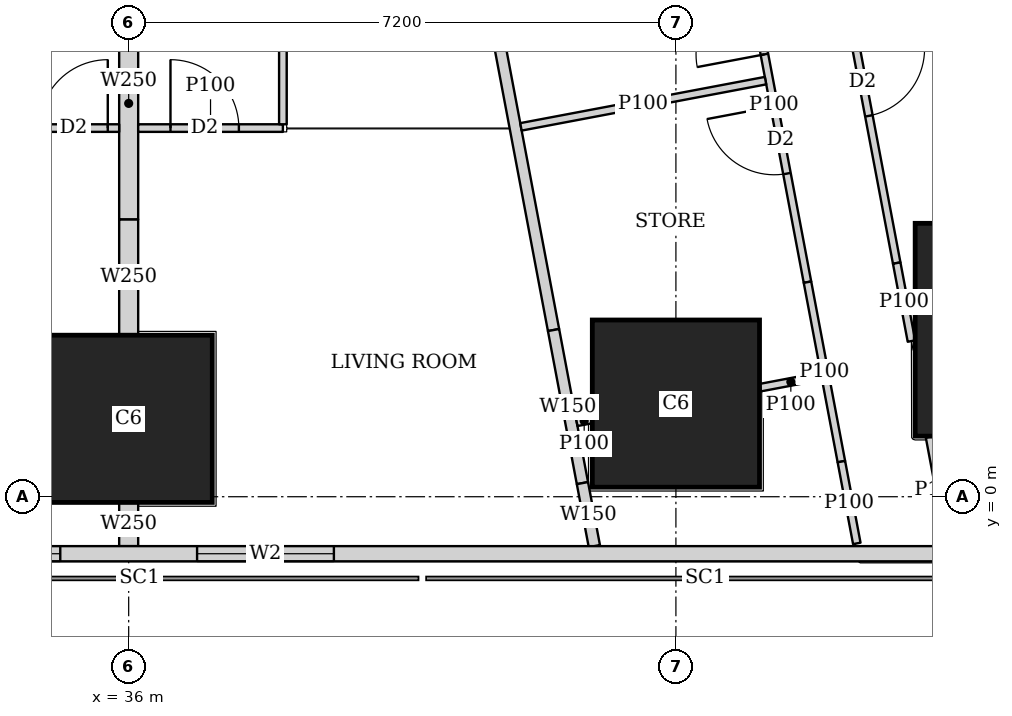
"""IFC4 building model, lengths in metres.
Left out: names, types, materials, properties, quantities, classifications, styles, units other than length and angle.
Written with IfcOpenShell. Run it as: python <this file> out.ifc"""

import sys

from ifc_helpers import new_model, si_unit, direction, frame, frame_2d, origin, origin_2d, place, context, subcontext, project, spatial, rectangle, extrude, element, fill, save


model = new_model("IFC4")
c1 = context("Model", 3, precision=1e-05, world=origin(), true_north=direction((0.0, 1.0)))
c2 = subcontext(c1, "Body", "Model", "MODEL_VIEW")
j1 = project(units=[si_unit("LENGTHUNIT", "METRE"), si_unit("PLANEANGLEUNIT", "RADIAN")], contexts=[c1])
p1 = place(None, origin())
s1 = spatial("IfcSite", under=j1, at=p1, CompositionType="ELEMENT")
p2 = place(p1, origin())
s2 = spatial("IfcBuilding", under=s1, at=p2, CompositionType="ELEMENT")
p3 = place(p2, frame((0.0, 0.0, 126.65)))
s3 = spatial("IfcBuildingStorey", under=s2, at=p3, CompositionType="ELEMENT", Elevation=126.65)
for number, where, z_axis, x_axis in (
    (1, (36.0, 1.025, 0.0), (0.0, 0.0, 1.0), (1.0, 0.0, 0.0)),
    (2, (43.2, 1.225, 0.0), (0.0, 0.0, 1.0), (1.0, 0.0, 0.0)),
):
    element("IfcColumn", number, at=place(p3, frame(where, z_axis=z_axis, x_axis=x_axis)), inside=s3, PredefinedType="COLUMN", context=c2, shape_type="SweptSolid", body=[
        extrude(rectangle(XDim=2.2, YDim=2.2, at=origin_2d()), origin(), (0.0, 0.0, 1.0), 3.75),
    ])
p4 = place(p3, frame((47.748, 2.197, 0.0), z_axis=(0.0, 0.0, 1.0), x_axis=(1.0, 0.0, 0.0)))
e3 = element("IfcColumn", 3, at=p4, inside=s3, PredefinedType="COLUMN", context=c2, shape_type="SweptSolid", body=[
    extrude(rectangle(XDim=2.8, YDim=2.8, at=origin_2d()), origin(), (0.0, 0.0, 1.0), 3.75),
])
p5 = place(p3, frame((2.163, -0.75, 0.0), z_axis=(0.0, 0.0, 1.0), x_axis=(1.0, 0.0, 0.0)))
e4 = element("IfcWall", 4, at=p5, inside=s3, PredefinedType="SOLIDWALL", context=c2, shape_type="SweptSolid", body=[
    extrude(rectangle(XDim=45.628, YDim=0.2, at=frame_2d((22.814, 0.0))), origin(), (0.0, 0.0, 1.0), 3.45),
])
p6 = place(p5, frame((9.537, 0.0, 0.9)))
e5 = element("IfcOpeningElement", 5, at=p6, cuts=e4, PredefinedType="OPENING", context=c2, shape_type="SweptSolid", body=[
    extrude(rectangle(XDim=1.8, YDim=1.5, at=frame_2d((0.9, 0.75))), frame((0.0, 0.11, 0.0), z_axis=(0.0, -1.0, 0.0), x_axis=(1.0, 0.0, 0.0)), (0.0, 0.0, 1.0), 0.22),
])
p7 = place(p5, frame((13.137, 0.0, 0.9)))
e6 = element("IfcOpeningElement", 6, at=p7, cuts=e4, PredefinedType="OPENING", context=c2, shape_type="SweptSolid", body=[
    extrude(rectangle(XDim=1.8, YDim=1.5, at=frame_2d((0.9, 0.75))), frame((0.0, 0.11, 0.0), z_axis=(0.0, -1.0, 0.0), x_axis=(1.0, 0.0, 0.0)), (0.0, 0.0, 1.0), 0.22),
])
p8 = place(p5, frame((16.737, 0.0, 0.9)))
e7 = element("IfcOpeningElement", 7, at=p8, cuts=e4, PredefinedType="OPENING", context=c2, shape_type="SweptSolid", body=[
    extrude(rectangle(XDim=1.8, YDim=1.5, at=frame_2d((0.9, 0.75))), frame((0.0, 0.11, 0.0), z_axis=(0.0, -1.0, 0.0), x_axis=(1.0, 0.0, 0.0)), (0.0, 0.0, 1.0), 0.22),
])
p9 = place(p5, frame((20.337, 0.0, 0.9)))
e8 = element("IfcOpeningElement", 8, at=p9, cuts=e4, PredefinedType="OPENING", context=c2, shape_type="SweptSolid", body=[
    extrude(rectangle(XDim=1.8, YDim=1.5, at=frame_2d((0.9, 0.75))), frame((0.0, 0.11, 0.0), z_axis=(0.0, -1.0, 0.0), x_axis=(1.0, 0.0, 0.0)), (0.0, 0.0, 1.0), 0.22),
])
p10 = place(p5, frame((23.937, 0.0, 0.9)))
e9 = element("IfcOpeningElement", 9, at=p10, cuts=e4, PredefinedType="OPENING", context=c2, shape_type="SweptSolid", body=[
    extrude(rectangle(XDim=1.8, YDim=1.5, at=frame_2d((0.9, 0.75))), frame((0.0, 0.11, 0.0), z_axis=(0.0, -1.0, 0.0), x_axis=(1.0, 0.0, 0.0)), (0.0, 0.0, 1.0), 0.22),
])
p11 = place(p5, frame((27.537, 0.0, 0.9)))
e10 = element("IfcOpeningElement", 10, at=p11, cuts=e4, PredefinedType="OPENING", context=c2, shape_type="SweptSolid", body=[
    extrude(rectangle(XDim=1.8, YDim=1.5, at=frame_2d((0.9, 0.75))), frame((0.0, 0.11, 0.0), z_axis=(0.0, -1.0, 0.0), x_axis=(1.0, 0.0, 0.0)), (0.0, 0.0, 1.0), 0.22),
])
p12 = place(p5, frame((31.137, 0.0, 0.9)))
e11 = element("IfcOpeningElement", 11, at=p12, cuts=e4, PredefinedType="OPENING", context=c2, shape_type="SweptSolid", body=[
    extrude(rectangle(XDim=1.8, YDim=1.5, at=frame_2d((0.9, 0.75))), frame((0.0, 0.11, 0.0), z_axis=(0.0, -1.0, 0.0), x_axis=(1.0, 0.0, 0.0)), (0.0, 0.0, 1.0), 0.22),
])
p13 = place(p5, frame((34.737, 0.0, 0.9)))
e12 = element("IfcOpeningElement", 12, at=p13, cuts=e4, PredefinedType="OPENING", context=c2, shape_type="SweptSolid", body=[
    extrude(rectangle(XDim=1.8, YDim=1.5, at=frame_2d((0.9, 0.75))), frame((0.0, 0.11, 0.0), z_axis=(0.0, -1.0, 0.0), x_axis=(1.0, 0.0, 0.0)), (0.0, 0.0, 1.0), 0.22),
])
p14 = place(p3, frame((50.653, 2.703, 0.0), z_axis=(0.0, 0.0, 1.0), x_axis=(-0.185612026696, 0.982623109613, 0.0)))
e13 = element("IfcWall", 13, at=p14, inside=s3, PredefinedType="SOLIDWALL", context=c2, shape_type="SweptSolid", body=[
    extrude(rectangle(XDim=41.393, YDim=0.2, at=frame_2d((20.697, 0.0))), origin(), (0.0, 0.0, 1.0), 3.45),
])
p15 = place(p14, frame((1.633, 0.0, 0.9)))
e14 = element("IfcOpeningElement", 14, at=p15, cuts=e13, PredefinedType="OPENING", context=c2, shape_type="SweptSolid", body=[
    extrude(rectangle(XDim=1.8, YDim=1.5, at=frame_2d((0.9, 0.75))), frame((0.0, 0.11, 0.0), z_axis=(0.0, -1.0, 0.0), x_axis=(1.0, 0.0, 0.0)), (0.0, 0.0, 1.0), 0.22),
])
p16 = place(p14, frame((6.032, 0.0, 0.9)))
e15 = element("IfcOpeningElement", 15, at=p16, cuts=e13, PredefinedType="OPENING", context=c2, shape_type="SweptSolid", body=[
    extrude(rectangle(XDim=1.8, YDim=1.5, at=frame_2d((0.9, 0.75))), frame((0.0, 0.11, 0.0), z_axis=(0.0, -1.0, 0.0), x_axis=(1.0, 0.0, 0.0)), (0.0, 0.0, 1.0), 0.22),
])
p17 = place(p14, frame((9.848, 0.0, 0.9)))
e16 = element("IfcOpeningElement", 16, at=p17, cuts=e13, PredefinedType="OPENING", context=c2, shape_type="SweptSolid", body=[
    extrude(rectangle(XDim=1.8, YDim=1.5, at=frame_2d((0.9, 0.75))), frame((0.0, 0.11, 0.0), z_axis=(0.0, -1.0, 0.0), x_axis=(1.0, 0.0, 0.0)), (0.0, 0.0, 1.0), 0.22),
])
p18 = place(p14, frame((13.664, 0.0, 0.9)))
e17 = element("IfcOpeningElement", 17, at=p18, cuts=e13, PredefinedType="OPENING", context=c2, shape_type="SweptSolid", body=[
    extrude(rectangle(XDim=1.8, YDim=1.5, at=frame_2d((0.9, 0.75))), frame((0.0, 0.11, 0.0), z_axis=(0.0, -1.0, 0.0), x_axis=(1.0, 0.0, 0.0)), (0.0, 0.0, 1.0), 0.22),
])
p19 = place(p14, frame((17.481, 0.0, 0.9)))
e18 = element("IfcOpeningElement", 18, at=p19, cuts=e13, PredefinedType="OPENING", context=c2, shape_type="SweptSolid", body=[
    extrude(rectangle(XDim=1.8, YDim=1.5, at=frame_2d((0.9, 0.75))), frame((0.0, 0.11, 0.0), z_axis=(0.0, -1.0, 0.0), x_axis=(1.0, 0.0, 0.0)), (0.0, 0.0, 1.0), 0.22),
])
p20 = place(p14, frame((21.297, 0.0, 0.9)))
e19 = element("IfcOpeningElement", 19, at=p20, cuts=e13, PredefinedType="OPENING", context=c2, shape_type="SweptSolid", body=[
    extrude(rectangle(XDim=1.8, YDim=1.5, at=frame_2d((0.9, 0.75))), frame((0.0, 0.11, 0.0), z_axis=(0.0, -1.0, 0.0), x_axis=(1.0, 0.0, 0.0)), (0.0, 0.0, 1.0), 0.22),
])
p21 = place(p14, frame((25.113, 0.0, 0.9)))
e20 = element("IfcOpeningElement", 20, at=p21, cuts=e13, PredefinedType="OPENING", context=c2, shape_type="SweptSolid", body=[
    extrude(rectangle(XDim=1.8, YDim=1.5, at=frame_2d((0.9, 0.75))), frame((0.0, 0.11, 0.0), z_axis=(0.0, -1.0, 0.0), x_axis=(1.0, 0.0, 0.0)), (0.0, 0.0, 1.0), 0.22),
])
p22 = place(p14, frame((28.93, 0.0, 0.9)))
e21 = element("IfcOpeningElement", 21, at=p22, cuts=e13, PredefinedType="OPENING", context=c2, shape_type="SweptSolid", body=[
    extrude(rectangle(XDim=1.8, YDim=1.5, at=frame_2d((0.9, 0.75))), frame((0.0, 0.11, 0.0), z_axis=(0.0, -1.0, 0.0), x_axis=(1.0, 0.0, 0.0)), (0.0, 0.0, 1.0), 0.22),
])
p23 = place(p14, frame((32.746, 0.0, 0.9)))
e22 = element("IfcOpeningElement", 22, at=p23, cuts=e13, PredefinedType="OPENING", context=c2, shape_type="SweptSolid", body=[
    extrude(rectangle(XDim=1.8, YDim=1.5, at=frame_2d((0.9, 0.75))), frame((0.0, 0.11, 0.0), z_axis=(0.0, -1.0, 0.0), x_axis=(1.0, 0.0, 0.0)), (0.0, 0.0, 1.0), 0.22),
])
p24 = place(p14, frame((36.481, 0.0, 0.9)))
e23 = element("IfcOpeningElement", 23, at=p24, cuts=e13, PredefinedType="OPENING", context=c2, shape_type="SweptSolid", body=[
    extrude(rectangle(XDim=1.8, YDim=1.5, at=frame_2d((0.9, 0.75))), frame((0.0, 0.11, 0.0), z_axis=(0.0, -1.0, 0.0), x_axis=(1.0, 0.0, 0.0)), (0.0, 0.0, 1.0), 0.22),
])
p25 = place(p3, frame((33.896, 42.929, 0.0), z_axis=(0.0, 0.0, 1.0), x_axis=(0.1855961604, -0.982626106535, 0.0)))
e24 = element("IfcWall", 24, at=p25, inside=s3, PredefinedType="SOLIDWALL", context=c2, shape_type="SweptSolid", body=[
    extrude(rectangle(XDim=41.456, YDim=0.15, at=frame_2d((20.728, 0.0))), origin(), (0.0, 0.0, 1.0), 2.45),
])
p26 = place(p25, frame((7.893, 0.0, 0.0)))
e25 = element("IfcOpeningElement", 25, at=p26, cuts=e24, PredefinedType="OPENING", context=c2, shape_type="SweptSolid", body=[
    extrude(rectangle(XDim=1.0, YDim=2.1, at=frame_2d((0.5, 1.05))), frame((0.0, 0.085, 0.0), z_axis=(0.0, -1.0, 0.0), x_axis=(1.0, 0.0, 0.0)), (0.0, 0.0, 1.0), 0.17),
])
p27 = place(p25, frame((12.468, 0.0, 0.0)))
e26 = element("IfcOpeningElement", 26, at=p27, cuts=e24, PredefinedType="OPENING", context=c2, shape_type="SweptSolid", body=[
    extrude(rectangle(XDim=1.0, YDim=2.1, at=frame_2d((0.5, 1.05))), frame((0.0, 0.085, 0.0), z_axis=(0.0, -1.0, 0.0), x_axis=(1.0, 0.0, 0.0)), (0.0, 0.0, 1.0), 0.17),
])
p28 = place(p25, frame((20.101, 0.0, 0.0)))
e27 = element("IfcOpeningElement", 27, at=p28, cuts=e24, PredefinedType="OPENING", context=c2, shape_type="SweptSolid", body=[
    extrude(rectangle(XDim=1.0, YDim=2.1, at=frame_2d((0.5, 1.05))), frame((0.0, 0.085, 0.0), z_axis=(0.0, -1.0, 0.0), x_axis=(1.0, 0.0, 0.0)), (0.0, 0.0, 1.0), 0.17),
])
p29 = place(p25, frame((31.064, 0.0, 0.0)))
e28 = element("IfcOpeningElement", 28, at=p29, cuts=e24, PredefinedType="OPENING", context=c2, shape_type="SweptSolid", body=[
    extrude(rectangle(XDim=1.0, YDim=2.1, at=frame_2d((0.5, 1.05))), frame((0.0, 0.085, 0.0), z_axis=(0.0, -1.0, 0.0), x_axis=(1.0, 0.0, 0.0)), (0.0, 0.0, 1.0), 0.17),
])
p30 = place(p3, frame((41.59, 2.193, 0.0), z_axis=(0.0, 0.0, 1.0), x_axis=(0.185338414215, -0.982674754034, 0.0)))
e29 = element("IfcWall", 29, at=p30, inside=s3, PredefinedType="SOLIDWALL", context=c2, shape_type="SweptSolid", body=[
    extrude(rectangle(XDim=2.05, YDim=0.15, at=frame_2d((1.025, 0.0))), origin(), (0.0, 0.0, 1.0), 2.15),
])
p31 = place(p3, frame((41.97, 0.179, 0.0), z_axis=(0.0, 0.0, 1.0), x_axis=(0.186088003244, -0.982533080893, 0.0)))
e30 = element("IfcWall", 30, at=p31, inside=s3, PredefinedType="SOLIDWALL", context=c2, shape_type="SweptSolid", body=[
    extrude(rectangle(XDim=0.844, YDim=0.15, at=frame_2d((0.422, 0.0))), origin(), (0.0, 0.0, 1.0), 3.45),
])
p32 = place(p3, frame((35.875, 4.85, 0.0), z_axis=(0.0, 0.0, 1.0), x_axis=(-1.0, 0.0, 0.0)))
e31 = element("IfcWall", 31, at=p32, inside=s3, PredefinedType="PARTITIONING", context=c2, shape_type="SweptSolid", body=[
    extrude(rectangle(XDim=3.475, YDim=0.1, at=frame_2d((1.738, 0.0))), origin(), (0.0, 0.0, 1.0), 3.45),
])
p33 = place(p32, frame((1.92, 0.0, 0.0)))
e32 = element("IfcOpeningElement", 32, at=p33, cuts=e31, PredefinedType="OPENING", context=c2, shape_type="SweptSolid", body=[
    extrude(rectangle(XDim=0.9, YDim=2.1, at=frame_2d((0.45, 1.05))), frame((0.0, 0.06, 0.0), z_axis=(0.0, -1.0, 0.0), x_axis=(1.0, 0.0, 0.0)), (0.0, 0.0, 1.0), 0.12),
])
p34 = place(p32, frame((0.15, 0.0, 0.0)))
e33 = element("IfcOpeningElement", 33, at=p34, cuts=e31, PredefinedType="OPENING", context=c2, shape_type="SweptSolid", body=[
    extrude(rectangle(XDim=0.9, YDim=2.1, at=frame_2d((0.45, 1.05))), frame((0.0, 0.06, 0.0), z_axis=(0.0, -1.0, 0.0), x_axis=(1.0, 0.0, 0.0)), (0.0, 0.0, 1.0), 0.12),
])
p35 = place(p3, frame((38.029, 4.85, 0.0), z_axis=(0.0, 0.0, 1.0), x_axis=(-1.0, 0.0, 0.0)))
e34 = element("IfcWall", 34, at=p35, inside=s3, PredefinedType="PARTITIONING", context=c2, shape_type="SweptSolid", body=[
    extrude(rectangle(XDim=1.904, YDim=0.1, at=frame_2d((0.952, 0.0))), origin(), (0.0, 0.0, 1.0), 3.45),
])
p36 = place(p35, frame((0.579, 0.0, 0.0)))
e35 = element("IfcOpeningElement", 35, at=p36, cuts=e34, PredefinedType="OPENING", context=c2, shape_type="SweptSolid", body=[
    extrude(rectangle(XDim=0.9, YDim=2.1, at=frame_2d((0.45, 1.05))), frame((0.0, 0.06, 0.0), z_axis=(0.0, -1.0, 0.0), x_axis=(1.0, 0.0, 0.0)), (0.0, 0.0, 1.0), 0.12),
])
p37 = place(p3, frame((38.029, 4.9, 0.0), z_axis=(0.0, 0.0, 1.0), x_axis=(0.0, 1.0, 0.0)))
e36 = element("IfcWall", 36, at=p37, inside=s3, PredefinedType="PARTITIONING", context=c2, shape_type="SweptSolid", body=[
    extrude(rectangle(XDim=3.275, YDim=0.1, at=frame_2d((1.638, 0.0))), origin(), (0.0, 0.0, 1.0), 3.45),
])
p38 = place(p3, frame((36.0, -0.65, 0.0), z_axis=(0.0, 0.0, 1.0), x_axis=(0.0, 1.0, 0.0)))
e37 = element("IfcWall", 37, at=p38, inside=s3, PredefinedType="SOLIDWALL", context=c2, shape_type="SweptSolid", body=[
    extrude(rectangle(XDim=0.574, YDim=0.25, at=frame_2d((0.287, 0.0))), origin(), (0.0, 0.0, 1.0), 3.45),
])
p39 = place(p3, frame((36.0, 2.126, 0.0), z_axis=(0.0, 0.0, 1.0), x_axis=(0.0, 1.0, 0.0)))
e38 = element("IfcWall", 38, at=p39, inside=s3, PredefinedType="SOLIDWALL", context=c2, shape_type="SweptSolid", body=[
    extrude(rectangle(XDim=1.524, YDim=0.25, at=frame_2d((0.762, 0.0))), origin(), (0.0, 0.0, 1.0), 3.45),
])
p40 = place(p3, frame((36.0, 3.65, 0.0), z_axis=(0.0, 0.0, 1.0), x_axis=(0.0, 1.0, 0.0)))
e39 = element("IfcWall", 39, at=p40, inside=s3, PredefinedType="SOLIDWALL", context=c2, shape_type="SweptSolid", body=[
    extrude(rectangle(XDim=3.049, YDim=0.25, at=frame_2d((1.524, 0.0))), origin(), (0.0, 0.0, 1.0), 3.45),
])
p41 = place(p3, frame((44.727, 10.366, 0.0), z_axis=(0.0, 0.0, 1.0), x_axis=(0.185678775129, -0.982610498858, 0.0)))
e40 = element("IfcWall", 40, at=p41, inside=s3, PredefinedType="PARTITIONING", context=c2, shape_type="SweptSolid", body=[
    extrude(rectangle(XDim=7.421, YDim=0.1, at=frame_2d((3.71, 0.0))), origin(), (0.0, 0.0, 1.0), 3.45),
])
p42 = place(p41, frame((0.151, 0.0, 0.0)))
e41 = element("IfcOpeningElement", 41, at=p42, cuts=e40, PredefinedType="OPENING", context=c2, shape_type="SweptSolid", body=[
    extrude(rectangle(XDim=0.9, YDim=2.1, at=frame_2d((0.45, 1.05))), frame((0.0, 0.06, 0.0), z_axis=(0.0, -1.0, 0.0), x_axis=(1.0, 0.0, 0.0)), (0.0, 0.0, 1.0), 0.12),
])
p43 = place(p41, frame((4.55, 0.0, 0.0)))
e42 = element("IfcOpeningElement", 42, at=p43, cuts=e40, PredefinedType="OPENING", context=c2, shape_type="SweptSolid", body=[
    extrude(rectangle(XDim=0.9, YDim=2.1, at=frame_2d((0.45, 1.05))), frame((0.0, 0.06, 0.0), z_axis=(0.0, -1.0, 0.0), x_axis=(1.0, 0.0, 0.0)), (0.0, 0.0, 1.0), 0.12),
])
p44 = place(p3, frame((46.105, 3.074, 0.0), z_axis=(0.0, 0.0, 1.0), x_axis=(0.185897769544, -0.982569091351, 0.0)))
e43 = element("IfcWall", 43, at=p44, inside=s3, PredefinedType="PARTITIONING", context=c2, shape_type="SweptSolid", body=[
    extrude(rectangle(XDim=1.044, YDim=0.1, at=frame_2d((0.522, 0.0))), origin(), (0.0, 0.0, 1.0), 2.0),
])
p45 = place(p3, frame((46.537, 0.787, 0.0), z_axis=(0.0, 0.0, 1.0), x_axis=(0.185348284603, -0.982672892368, 0.0)))
e44 = element("IfcWall", 44, at=p45, inside=s3, PredefinedType="PARTITIONING", context=c2, shape_type="SweptSolid", body=[
    extrude(rectangle(XDim=1.419, YDim=0.1, at=frame_2d((0.709, 0.0))), origin(), (0.0, 0.0, 1.0), 2.0),
])
p46 = place(p3, frame((44.049, 7.49, 0.0), z_axis=(0.0, 0.0, 1.0), x_axis=(0.185666332607, -0.982612849975, 0.0)))
e45 = element("IfcWall", 45, at=p46, inside=s3, PredefinedType="PARTITIONING", context=c2, shape_type="SweptSolid", body=[
    extrude(rectangle(XDim=4.75, YDim=0.1, at=frame_2d((2.375, 0.0))), origin(), (0.0, 0.0, 1.0), 3.45),
])
p47 = place(p46, frame((0.8, 0.0, 0.0)))
e46 = element("IfcOpeningElement", 46, at=p47, cuts=e45, PredefinedType="OPENING", context=c2, shape_type="SweptSolid", body=[
    extrude(rectangle(XDim=0.9, YDim=2.1, at=frame_2d((0.45, 1.05))), frame((0.0, 0.06, 0.0), z_axis=(0.0, -1.0, 0.0), x_axis=(1.0, 0.0, 0.0)), (0.0, 0.0, 1.0), 0.12),
])
p48 = place(p46, frame((2.396, 0.0, 0.0)))
e47 = element("IfcOpeningElement", 47, at=p48, cuts=e45, PredefinedType="OPENING", context=c2, shape_type="SweptSolid", body=[
    extrude(rectangle(XDim=0.9, YDim=2.1, at=frame_2d((0.45, 1.05))), frame((0.0, 0.06, 0.0), z_axis=(0.0, -1.0, 0.0), x_axis=(1.0, 0.0, 0.0)), (0.0, 0.0, 1.0), 0.12),
])
p49 = place(p3, frame((44.931, 2.823, 0.0), z_axis=(0.0, 0.0, 1.0), x_axis=(0.185631845838, -0.982619365681, 0.0)))
e48 = element("IfcWall", 48, at=p49, inside=s3, PredefinedType="PARTITIONING", context=c2, shape_type="SweptSolid", body=[
    extrude(rectangle(XDim=2.403, YDim=0.1, at=frame_2d((1.201, 0.0))), origin(), (0.0, 0.0, 1.0), 2.0),
])
p50 = place(p3, frame((45.377, 0.462, 0.0), z_axis=(0.0, 0.0, 1.0), x_axis=(0.185513480919, -0.982641719243, 0.0)))
e49 = element("IfcWall", 49, at=p50, inside=s3, PredefinedType="PARTITIONING", context=c2, shape_type="SweptSolid", body=[
    extrude(rectangle(XDim=1.095, YDim=0.1, at=frame_2d((0.547, 0.0))), origin(), (0.0, 0.0, 1.0), 3.45),
])
p51 = place(p3, frame((45.114, 1.587, 0.0), z_axis=(0.0, 0.0, 1.0), x_axis=(-0.982624706348, -0.185603573443, 0.0)))
e50 = element("IfcWall", 50, at=p51, inside=s3, PredefinedType="PARTITIONING", context=c2, shape_type="SweptSolid", body=[
    extrude(rectangle(XDim=0.818, YDim=0.1, at=frame_2d((0.409, 0.0))), origin(), (0.0, 0.0, 1.0), 2.0),
])
p52 = place(p3, frame((42.09, 1.016, 0.0), z_axis=(0.0, 0.0, 1.0), x_axis=(-0.982208563973, -0.187793335502, 0.0)))
e51 = element("IfcWall", 51, at=p52, inside=s3, PredefinedType="PARTITIONING", context=c2, shape_type="SweptSolid", body=[
    extrude(rectangle(XDim=0.198, YDim=0.1, at=frame_2d((0.099, 0.0))), origin(), (0.0, 0.0, 1.0), 2.0),
])
p53 = place(p3, frame((44.379, 5.474, 0.0), z_axis=(0.0, 0.0, 1.0), x_axis=(-0.982607026909, -0.185697147715, 0.0)))
e52 = element("IfcWall", 52, at=p53, inside=s3, PredefinedType="PARTITIONING", context=c2, shape_type="SweptSolid", body=[
    extrude(rectangle(XDim=3.275, YDim=0.1, at=frame_2d((1.637, 0.0))), origin(), (0.0, 0.0, 1.0), 3.45),
])
p54 = place(p12, origin())
e53 = element("IfcWindow", 53, at=p54, inside=s3, PartitioningType="SINGLE_PANEL", PredefinedType="WINDOW", context=c2, shape_type="SweptSolid", body=[
    extrude(rectangle(XDim=1.8, YDim=1.5, at=frame_2d((0.9, 0.75))), frame((0.0, 0.03, 0.0), z_axis=(0.0, -1.0, 0.0), x_axis=(1.0, 0.0, 0.0)), (0.0, 0.0, 1.0), 0.06),
])
fill(e11, e53)
p55 = place(p13, origin())
e54 = element("IfcWindow", 54, at=p55, inside=s3, PartitioningType="SINGLE_PANEL", PredefinedType="WINDOW", context=c2, shape_type="SweptSolid", body=[
    extrude(rectangle(XDim=1.8, YDim=1.5, at=frame_2d((0.9, 0.75))), frame((0.0, 0.03, 0.0), z_axis=(0.0, -1.0, 0.0), x_axis=(1.0, 0.0, 0.0)), (0.0, 0.0, 1.0), 0.06),
])
fill(e12, e54)
p56 = place(p34, origin())
e55 = element("IfcDoor", 55, at=p56, inside=s3, OperationType="SINGLE_SWING_RIGHT", PredefinedType="DOOR", context=c2, shape_type="SweptSolid", body=[
    extrude(rectangle(XDim=0.9, YDim=2.1, at=frame_2d((0.45, 1.05))), frame((0.0, 0.025, 0.0), z_axis=(0.0, -1.0, 0.0), x_axis=(1.0, 0.0, 0.0)), (0.0, 0.0, 1.0), 0.05),
])
fill(e33, e55)
p57 = place(p36, origin())
e56 = element("IfcDoor", 56, at=p57, inside=s3, OperationType="SINGLE_SWING_LEFT", PredefinedType="DOOR", context=c2, shape_type="SweptSolid", body=[
    extrude(rectangle(XDim=0.9, YDim=2.1, at=frame_2d((0.45, 1.05))), frame((0.0, 0.025, 0.0), z_axis=(0.0, -1.0, 0.0), x_axis=(1.0, 0.0, 0.0)), (0.0, 0.0, 1.0), 0.05),
])
fill(e35, e56)
p58 = place(p43, origin())
e57 = element("IfcDoor", 57, at=p58, inside=s3, OperationType="SINGLE_SWING_LEFT", PredefinedType="DOOR", context=c2, shape_type="SweptSolid", body=[
    extrude(rectangle(XDim=0.9, YDim=2.1, at=frame_2d((0.45, 1.05))), frame((0.0, 0.025, 0.0), z_axis=(0.0, -1.0, 0.0), x_axis=(1.0, 0.0, 0.0)), (0.0, 0.0, 1.0), 0.05),
])
fill(e42, e57)
p59 = place(p47, origin())
e58 = element("IfcDoor", 58, at=p59, inside=s3, OperationType="SINGLE_SWING_LEFT", PredefinedType="DOOR", context=c2, shape_type="SweptSolid", body=[
    extrude(rectangle(XDim=0.9, YDim=2.1, at=frame_2d((0.45, 1.05))), frame((0.0, 0.025, 0.0), z_axis=(0.0, -1.0, 0.0), x_axis=(1.0, 0.0, 0.0)), (0.0, 0.0, 1.0), 0.05),
])
fill(e46, e58)
p60 = place(p48, origin())
e59 = element("IfcDoor", 59, at=p60, inside=s3, OperationType="SINGLE_SWING_RIGHT", PredefinedType="DOOR", context=c2, shape_type="SweptSolid", body=[
    extrude(rectangle(XDim=0.9, YDim=2.1, at=frame_2d((0.45, 1.05))), frame((0.0, 0.025, 0.0), z_axis=(0.0, -1.0, 0.0), x_axis=(1.0, 0.0, 0.0)), (0.0, 0.0, 1.0), 0.05),
])
fill(e47, e59)
save(model, sys.argv[1])
